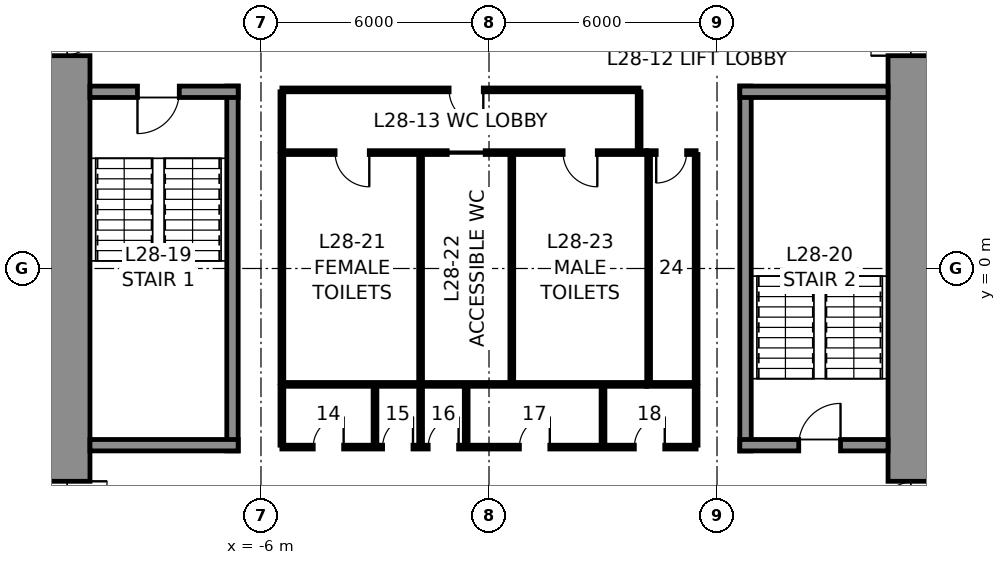
"""IFC4 building model, lengths in metres.
Left out: names, types, materials, properties, quantities, classifications, styles, units other than length and angle.
Written with IfcOpenShell. Run it as: python <this file> out.ifc"""

import sys

from ifc_helpers import new_model, si_unit, direction, frame, frame_2d, origin, place, context, subcontext, project, spatial, rectangle, extrude, element, fill, save


model = new_model("IFC4")
c1 = context("Model", 3, precision=1e-05, world=origin(), true_north=direction((0.0, 1.0)))
c2 = subcontext(c1, "Body", "Model", "MODEL_VIEW")
j1 = project(units=[si_unit("LENGTHUNIT", "METRE"), si_unit("PLANEANGLEUNIT", "RADIAN")], contexts=[c1])
p1 = place(None, origin())
s1 = spatial("IfcSite", under=j1, at=p1, CompositionType="ELEMENT")
p2 = place(p1, origin())
s2 = spatial("IfcBuilding", under=s1, at=p2, CompositionType="ELEMENT")
p3 = place(p2, frame((0.0, 0.0, 139.8)))
s3 = spatial("IfcBuildingStorey", under=s2, at=p3, CompositionType="ELEMENT", Elevation=139.8)
p4 = place(p3, frame((11.25, 10.5, 0.0), z_axis=(0.0, 0.0, 1.0), x_axis=(0.0, -1.0, 0.0)))
e1 = element("IfcWall", 1, at=p4, inside=s3, PredefinedType="SHEAR", context=c2, shape_type="SweptSolid", body=[
    extrude(rectangle(XDim=21.0, YDim=1.5, at=frame_2d((10.5, 0.0))), origin(), (0.0, 0.0, 1.0), 4.0),
])
p5 = place(p4, frame((3.7, 0.0, 0.0)))
e2 = element("IfcOpeningElement", 2, at=p5, cuts=e1, PredefinedType="OPENING", context=c2, shape_type="SweptSolid", body=[
    extrude(rectangle(XDim=1.2, YDim=2.3, at=frame_2d((0.6, 1.15))), frame((0.0, 0.76, 0.0), z_axis=(0.0, -1.0, 0.0), x_axis=(1.0, 0.0, 0.0)), (0.0, 0.0, 1.0), 1.52),
])
p6 = place(p4, frame((16.1, 0.0, 0.0)))
e3 = element("IfcOpeningElement", 3, at=p6, cuts=e1, PredefinedType="OPENING", context=c2, shape_type="SweptSolid", body=[
    extrude(rectangle(XDim=1.2, YDim=2.3, at=frame_2d((0.6, 1.15))), frame((0.0, 0.76, 0.0), z_axis=(0.0, -1.0, 0.0), x_axis=(1.0, 0.0, 0.0)), (0.0, 0.0, 1.0), 1.52),
])
p7 = place(p3, frame((-11.25, -10.5, 0.0), z_axis=(0.0, 0.0, 1.0), x_axis=(0.0, 1.0, 0.0)))
e4 = element("IfcWall", 4, at=p7, inside=s3, PredefinedType="SHEAR", context=c2, shape_type="SweptSolid", body=[
    extrude(rectangle(XDim=21.0, YDim=1.5, at=frame_2d((10.5, 0.0))), origin(), (0.0, 0.0, 1.0), 4.0),
])
p8 = place(p7, frame((16.1, 0.0, 0.0)))
e5 = element("IfcOpeningElement", 5, at=p8, cuts=e4, PredefinedType="OPENING", context=c2, shape_type="SweptSolid", body=[
    extrude(rectangle(XDim=1.2, YDim=2.3, at=frame_2d((0.6, 1.15))), frame((0.0, 0.76, 0.0), z_axis=(0.0, -1.0, 0.0), x_axis=(1.0, 0.0, 0.0)), (0.0, 0.0, 1.0), 1.52),
])
p9 = place(p7, frame((3.7, 0.0, 0.0)))
e6 = element("IfcOpeningElement", 6, at=p9, cuts=e4, PredefinedType="OPENING", context=c2, shape_type="SweptSolid", body=[
    extrude(rectangle(XDim=1.2, YDim=2.3, at=frame_2d((0.6, 1.15))), frame((0.0, 0.76, 0.0), z_axis=(0.0, -1.0, 0.0), x_axis=(1.0, 0.0, 0.0)), (0.0, 0.0, 1.0), 1.52),
])
p10 = place(p3, frame((-6.75, -4.8, 0.0), z_axis=(0.0, 0.0, 1.0), x_axis=(0.0, 1.0, 0.0)))
e7 = element("IfcWall", 7, at=p10, inside=s3, PredefinedType="SOLIDWALL", context=c2, shape_type="SweptSolid", body=[
    extrude(rectangle(XDim=9.6, YDim=0.3, at=frame_2d((4.8, 0.0))), origin(), (0.0, 0.0, 1.0), 3.75),
])
p11 = place(p3, frame((-10.5, 4.65, 0.0), z_axis=(0.0, 0.0, 1.0), x_axis=(1.0, 0.0, 0.0)))
e8 = element("IfcWall", 8, at=p11, inside=s3, PredefinedType="SOLIDWALL", context=c2, shape_type="SweptSolid", body=[
    extrude(rectangle(XDim=3.9, YDim=0.3, at=frame_2d((1.95, 0.0))), origin(), (0.0, 0.0, 1.0), 3.75),
])
p12 = place(p11, frame((1.25, 0.0, 0.0)))
e9 = element("IfcOpeningElement", 9, at=p12, cuts=e8, PredefinedType="OPENING", context=c2, shape_type="SweptSolid", body=[
    extrude(rectangle(XDim=1.1, YDim=2.3, at=frame_2d((0.55, 1.15))), frame((0.0, 0.16, 0.0), z_axis=(0.0, -1.0, 0.0), x_axis=(1.0, 0.0, 0.0)), (0.0, 0.0, 1.0), 0.32),
])
p13 = place(p3, frame((-6.6, -4.65, 0.0), z_axis=(0.0, 0.0, 1.0), x_axis=(-1.0, 0.0, 0.0)))
e10 = element("IfcWall", 10, at=p13, inside=s3, PredefinedType="SOLIDWALL", context=c2, shape_type="SweptSolid", body=[
    extrude(rectangle(XDim=3.9, YDim=0.3, at=frame_2d((1.95, 0.0))), origin(), (0.0, 0.0, 1.0), 3.75),
])
p14 = place(p3, frame((6.75, -4.8, 0.0), z_axis=(0.0, 0.0, 1.0), x_axis=(0.0, 1.0, 0.0)))
e11 = element("IfcWall", 11, at=p14, inside=s3, PredefinedType="SOLIDWALL", context=c2, shape_type="SweptSolid", body=[
    extrude(rectangle(XDim=9.6, YDim=0.3, at=frame_2d((4.8, 0.0))), origin(), (0.0, 0.0, 1.0), 3.75),
])
p15 = place(p3, frame((6.6, 4.65, 0.0), z_axis=(0.0, 0.0, 1.0), x_axis=(1.0, 0.0, 0.0)))
e12 = element("IfcWall", 12, at=p15, inside=s3, PredefinedType="SOLIDWALL", context=c2, shape_type="SweptSolid", body=[
    extrude(rectangle(XDim=3.9, YDim=0.3, at=frame_2d((1.95, 0.0))), origin(), (0.0, 0.0, 1.0), 3.75),
])
p16 = place(p3, frame((10.5, -4.65, 0.0), z_axis=(0.0, 0.0, 1.0), x_axis=(-1.0, 0.0, 0.0)))
e13 = element("IfcWall", 13, at=p16, inside=s3, PredefinedType="SOLIDWALL", context=c2, shape_type="SweptSolid", body=[
    extrude(rectangle(XDim=3.9, YDim=0.3, at=frame_2d((1.95, 0.0))), origin(), (0.0, 0.0, 1.0), 3.75),
])
p17 = place(p16, frame((1.25, 0.0, 0.0)))
e14 = element("IfcOpeningElement", 14, at=p17, cuts=e13, PredefinedType="OPENING", context=c2, shape_type="SweptSolid", body=[
    extrude(rectangle(XDim=1.1, YDim=2.3, at=frame_2d((0.55, 1.15))), frame((0.0, 0.16, 0.0), z_axis=(0.0, -1.0, 0.0), x_axis=(1.0, 0.0, 0.0)), (0.0, 0.0, 1.0), 0.32),
])
p18 = place(p3, frame((-5.45, 3.05, 0.0), z_axis=(0.0, 0.0, 1.0), x_axis=(1.0, 0.0, 0.0)))
e15 = element("IfcWall", 15, at=p18, inside=s3, PredefinedType="PARTITIONING", context=c2, shape_type="SweptSolid", body=[
    extrude(rectangle(XDim=9.6, YDim=0.1, at=frame_2d((4.8, 0.0))), origin(), (0.0, 0.0, 1.0), 3.75),
])
p19 = place(p18, frame((1.4, 0.0, 0.0)))
e16 = element("IfcOpeningElement", 16, at=p19, cuts=e15, PredefinedType="OPENING", context=c2, shape_type="SweptSolid", body=[
    extrude(rectangle(XDim=0.9, YDim=2.3, at=frame_2d((0.45, 1.15))), frame((0.0, 0.06, 0.0), z_axis=(0.0, -1.0, 0.0), x_axis=(1.0, 0.0, 0.0)), (0.0, 0.0, 1.0), 0.12),
])
p20 = place(p18, frame((4.35, 0.0, 0.0)))
e17 = element("IfcOpeningElement", 17, at=p20, cuts=e15, PredefinedType="OPENING", context=c2, shape_type="SweptSolid", body=[
    extrude(rectangle(XDim=1.0, YDim=2.3, at=frame_2d((0.5, 1.15))), frame((0.0, 0.06, 0.0), z_axis=(0.0, -1.0, 0.0), x_axis=(1.0, 0.0, 0.0)), (0.0, 0.0, 1.0), 0.12),
])
p21 = place(p18, frame((7.4, 0.0, 0.0)))
e18 = element("IfcOpeningElement", 18, at=p21, cuts=e15, PredefinedType="OPENING", context=c2, shape_type="SweptSolid", body=[
    extrude(rectangle(XDim=0.9, YDim=2.3, at=frame_2d((0.45, 1.15))), frame((0.0, 0.06, 0.0), z_axis=(0.0, -1.0, 0.0), x_axis=(1.0, 0.0, 0.0)), (0.0, 0.0, 1.0), 0.12),
])
p22 = place(p3, frame((4.15, 3.05, 0.0), z_axis=(0.0, 0.0, 1.0), x_axis=(1.0, 0.0, 0.0)))
e19 = element("IfcWall", 19, at=p22, inside=s3, PredefinedType="PARTITIONING", context=c2, shape_type="SweptSolid", body=[
    extrude(rectangle(XDim=1.3, YDim=0.1, at=frame_2d((0.65, 0.0))), origin(), (0.0, 0.0, 1.0), 3.75),
])
p23 = place(p22, frame((0.25, 0.0, 0.0)))
e20 = element("IfcOpeningElement", 20, at=p23, cuts=e19, PredefinedType="OPENING", context=c2, shape_type="SweptSolid", body=[
    extrude(rectangle(XDim=0.8, YDim=2.3, at=frame_2d((0.4, 1.15))), frame((0.0, 0.06, 0.0), z_axis=(0.0, -1.0, 0.0), x_axis=(1.0, 0.0, 0.0)), (0.0, 0.0, 1.0), 0.12),
])
p24 = place(p3, frame((4.15, -3.05, 0.0), z_axis=(0.0, 0.0, 1.0), x_axis=(-1.0, 0.0, 0.0)))
e21 = element("IfcWall", 21, at=p24, inside=s3, PredefinedType="PARTITIONING", context=c2, shape_type="SweptSolid", body=[
    extrude(rectangle(XDim=9.6, YDim=0.1, at=frame_2d((4.8, 0.0))), origin(), (0.0, 0.0, 1.0), 3.75),
])
p25 = place(p3, frame((5.45, -3.05, 0.0), z_axis=(0.0, 0.0, 1.0), x_axis=(-1.0, 0.0, 0.0)))
e22 = element("IfcWall", 22, at=p25, inside=s3, PredefinedType="PARTITIONING", context=c2, shape_type="SweptSolid", body=[
    extrude(rectangle(XDim=1.3, YDim=0.1, at=frame_2d((0.65, 0.0))), origin(), (0.0, 0.0, 1.0), 3.75),
])
for number, where, z_axis, x_axis in (
    (23, (5.45, 3.0, 0.0), (0.0, 0.0, 1.0), (0.0, -1.0, 0.0)),
    (24, (-5.45, -3.0, 0.0), (0.0, 0.0, 1.0), (0.0, 1.0, 0.0)),
    (25, (-1.8, -3.0, 0.0), (0.0, 0.0, 1.0), (0.0, 1.0, 0.0)),
    (26, (0.6, -3.0, 0.0), (0.0, 0.0, 1.0), (0.0, 1.0, 0.0)),
    (27, (4.2, -3.0, 0.0), (0.0, 0.0, 1.0), (0.0, 1.0, 0.0)),
):
    element("IfcWall", number, at=place(p3, frame(where, z_axis=z_axis, x_axis=x_axis)), inside=s3, PredefinedType="PARTITIONING", context=c2, shape_type="SweptSolid", body=[
        extrude(rectangle(XDim=6.0, YDim=0.1, at=frame_2d((3.0, 0.0))), origin(), (0.0, 0.0, 1.0), 3.75),
    ])
p26 = place(p3, frame((-5.45, 4.7, 0.0), z_axis=(0.0, 0.0, 1.0), x_axis=(1.0, 0.0, 0.0)))
e28 = element("IfcWall", 28, at=p26, inside=s3, PredefinedType="PARTITIONING", context=c2, shape_type="SweptSolid", body=[
    extrude(rectangle(XDim=9.4, YDim=0.1, at=frame_2d((4.7, 0.0))), origin(), (0.0, 0.0, 1.0), 3.75),
])
p27 = place(p26, frame((4.4, 0.0, 0.0)))
e29 = element("IfcOpeningElement", 29, at=p27, cuts=e28, PredefinedType="OPENING", context=c2, shape_type="SweptSolid", body=[
    extrude(rectangle(XDim=0.9, YDim=2.3, at=frame_2d((0.45, 1.15))), frame((0.0, 0.06, 0.0), z_axis=(0.0, -1.0, 0.0), x_axis=(1.0, 0.0, 0.0)), (0.0, 0.0, 1.0), 0.12),
])
for number, where, z_axis, x_axis in (
    (30, (-5.45, 3.1, 0.0), (0.0, 0.0, 1.0), (0.0, 1.0, 0.0)),
    (31, (3.95, 3.1, 0.0), (0.0, 0.0, 1.0), (0.0, 1.0, 0.0)),
):
    element("IfcWall", number, at=place(p3, frame(where, z_axis=z_axis, x_axis=x_axis)), inside=s3, PredefinedType="PARTITIONING", context=c2, shape_type="SweptSolid", body=[
        extrude(rectangle(XDim=1.55, YDim=0.1, at=frame_2d((0.775, 0.0))), origin(), (0.0, 0.0, 1.0), 3.75),
    ])
p28 = place(p3, frame((5.45, -4.7, 0.0), z_axis=(0.0, 0.0, 1.0), x_axis=(-1.0, 0.0, 0.0)))
e32 = element("IfcWall", 32, at=p28, inside=s3, PredefinedType="PARTITIONING", context=c2, shape_type="SweptSolid", body=[
    extrude(rectangle(XDim=10.9, YDim=0.1, at=frame_2d((5.45, 0.0))), origin(), (0.0, 0.0, 1.0), 3.75),
])
p29 = place(p28, frame((9.275, 0.0, 0.0)))
e33 = element("IfcOpeningElement", 33, at=p29, cuts=e32, PredefinedType="OPENING", context=c2, shape_type="SweptSolid", body=[
    extrude(rectangle(XDim=0.8, YDim=2.3, at=frame_2d((0.4, 1.15))), frame((0.0, 0.06, 0.0), z_axis=(0.0, -1.0, 0.0), x_axis=(1.0, 0.0, 0.0)), (0.0, 0.0, 1.0), 0.12),
])
p30 = place(p28, frame((7.45, 0.0, 0.0)))
e34 = element("IfcOpeningElement", 34, at=p30, cuts=e32, PredefinedType="OPENING", context=c2, shape_type="SweptSolid", body=[
    extrude(rectangle(XDim=0.8, YDim=2.3, at=frame_2d((0.4, 1.15))), frame((0.0, 0.06, 0.0), z_axis=(0.0, -1.0, 0.0), x_axis=(1.0, 0.0, 0.0)), (0.0, 0.0, 1.0), 0.12),
])
p31 = place(p28, frame((6.25, 0.0, 0.0)))
e35 = element("IfcOpeningElement", 35, at=p31, cuts=e32, PredefinedType="OPENING", context=c2, shape_type="SweptSolid", body=[
    extrude(rectangle(XDim=0.8, YDim=2.3, at=frame_2d((0.4, 1.15))), frame((0.0, 0.06, 0.0), z_axis=(0.0, -1.0, 0.0), x_axis=(1.0, 0.0, 0.0)), (0.0, 0.0, 1.0), 0.12),
])
p32 = place(p28, frame((3.85, 0.0, 0.0)))
e36 = element("IfcOpeningElement", 36, at=p32, cuts=e32, PredefinedType="OPENING", context=c2, shape_type="SweptSolid", body=[
    extrude(rectangle(XDim=0.8, YDim=2.3, at=frame_2d((0.4, 1.15))), frame((0.0, 0.06, 0.0), z_axis=(0.0, -1.0, 0.0), x_axis=(1.0, 0.0, 0.0)), (0.0, 0.0, 1.0), 0.12),
])
p33 = place(p28, frame((0.825, 0.0, 0.0)))
e37 = element("IfcOpeningElement", 37, at=p33, cuts=e32, PredefinedType="OPENING", context=c2, shape_type="SweptSolid", body=[
    extrude(rectangle(XDim=0.8, YDim=2.3, at=frame_2d((0.4, 1.15))), frame((0.0, 0.06, 0.0), z_axis=(0.0, -1.0, 0.0), x_axis=(1.0, 0.0, 0.0)), (0.0, 0.0, 1.0), 0.12),
])
for number, where, z_axis, x_axis in (
    (38, (-5.45, -3.1, 0.0), (0.0, 0.0, 1.0), (0.0, -1.0, 0.0)),
    (39, (5.45, -3.1, 0.0), (0.0, 0.0, 1.0), (0.0, -1.0, 0.0)),
    (40, (-3.0, -3.1, 0.0), (0.0, 0.0, 1.0), (0.0, -1.0, 0.0)),
    (41, (-1.8, -3.1, 0.0), (0.0, 0.0, 1.0), (0.0, -1.0, 0.0)),
    (42, (-0.6, -3.1, 0.0), (0.0, 0.0, 1.0), (0.0, -1.0, 0.0)),
    (43, (3.0, -3.1, 0.0), (0.0, 0.0, 1.0), (0.0, -1.0, 0.0)),
):
    element("IfcWall", number, at=place(p3, frame(where, z_axis=z_axis, x_axis=x_axis)), inside=s3, PredefinedType="PARTITIONING", context=c2, shape_type="SweptSolid", body=[
        extrude(rectangle(XDim=1.55, YDim=0.1, at=frame_2d((0.775, 0.0))), origin(), (0.0, 0.0, 1.0), 3.75),
    ])
p34 = place(p12, frame((1.1, 0.0, 0.0), z_axis=(0.0, 0.0, 1.0), x_axis=(-1.0, 0.0, 0.0)))
e44 = element("IfcDoor", 44, at=p34, inside=s3, OperationType="SINGLE_SWING_RIGHT", PredefinedType="DOOR", context=c2, shape_type="SweptSolid", body=[
    extrude(rectangle(XDim=1.1, YDim=2.3, at=frame_2d((0.55, 1.15))), frame((0.0, 0.025, 0.0), z_axis=(0.0, -1.0, 0.0), x_axis=(1.0, 0.0, 0.0)), (0.0, 0.0, 1.0), 0.05),
])
fill(e9, e44)
p35 = place(p17, frame((1.1, 0.0, 0.0), z_axis=(0.0, 0.0, 1.0), x_axis=(-1.0, 0.0, 0.0)))
e45 = element("IfcDoor", 45, at=p35, inside=s3, OperationType="SINGLE_SWING_RIGHT", PredefinedType="DOOR", context=c2, shape_type="SweptSolid", body=[
    extrude(rectangle(XDim=1.1, YDim=2.3, at=frame_2d((0.55, 1.15))), frame((0.0, 0.025, 0.0), z_axis=(0.0, -1.0, 0.0), x_axis=(1.0, 0.0, 0.0)), (0.0, 0.0, 1.0), 0.05),
])
fill(e14, e45)
p36 = place(p19, frame((0.9, 0.0, 0.0), z_axis=(0.0, 0.0, 1.0), x_axis=(-1.0, 0.0, 0.0)))
e46 = element("IfcDoor", 46, at=p36, inside=s3, OperationType="SINGLE_SWING_LEFT", PredefinedType="DOOR", context=c2, shape_type="SweptSolid", body=[
    extrude(rectangle(XDim=0.9, YDim=2.3, at=frame_2d((0.45, 1.15))), frame((0.0, 0.025, 0.0), z_axis=(0.0, -1.0, 0.0), x_axis=(1.0, 0.0, 0.0)), (0.0, 0.0, 1.0), 0.05),
])
fill(e16, e46)
p37 = place(p20, frame((1.0, 0.0, 0.0), z_axis=(0.0, 0.0, 1.0), x_axis=(-1.0, 0.0, 0.0)))
e47 = element("IfcDoor", 47, at=p37, inside=s3, OperationType="SLIDING_TO_LEFT", PredefinedType="DOOR", context=c2, shape_type="SweptSolid", body=[
    extrude(rectangle(XDim=1.0, YDim=2.3, at=frame_2d((0.5, 1.15))), frame((0.0, 0.025, 0.0), z_axis=(0.0, -1.0, 0.0), x_axis=(1.0, 0.0, 0.0)), (0.0, 0.0, 1.0), 0.05),
])
fill(e17, e47)
p38 = place(p21, frame((0.9, 0.0, 0.0), z_axis=(0.0, 0.0, 1.0), x_axis=(-1.0, 0.0, 0.0)))
e48 = element("IfcDoor", 48, at=p38, inside=s3, OperationType="SINGLE_SWING_LEFT", PredefinedType="DOOR", context=c2, shape_type="SweptSolid", body=[
    extrude(rectangle(XDim=0.9, YDim=2.3, at=frame_2d((0.45, 1.15))), frame((0.0, 0.025, 0.0), z_axis=(0.0, -1.0, 0.0), x_axis=(1.0, 0.0, 0.0)), (0.0, 0.0, 1.0), 0.05),
])
fill(e18, e48)
p39 = place(p23, frame((0.8, 0.0, 0.0), z_axis=(0.0, 0.0, 1.0), x_axis=(-1.0, 0.0, 0.0)))
e49 = element("IfcDoor", 49, at=p39, inside=s3, OperationType="SINGLE_SWING_RIGHT", PredefinedType="DOOR", context=c2, shape_type="SweptSolid", body=[
    extrude(rectangle(XDim=0.8, YDim=2.3, at=frame_2d((0.4, 1.15))), frame((0.0, 0.025, 0.0), z_axis=(0.0, -1.0, 0.0), x_axis=(1.0, 0.0, 0.0)), (0.0, 0.0, 1.0), 0.05),
])
fill(e20, e49)
p40 = place(p27, frame((0.9, 0.0, 0.0), z_axis=(0.0, 0.0, 1.0), x_axis=(-1.0, 0.0, 0.0)))
e50 = element("IfcDoor", 50, at=p40, inside=s3, OperationType="SINGLE_SWING_LEFT", PredefinedType="DOOR", context=c2, shape_type="SweptSolid", body=[
    extrude(rectangle(XDim=0.9, YDim=2.3, at=frame_2d((0.45, 1.15))), frame((0.0, 0.025, 0.0), z_axis=(0.0, -1.0, 0.0), x_axis=(1.0, 0.0, 0.0)), (0.0, 0.0, 1.0), 0.05),
])
fill(e29, e50)
p41 = place(p29, frame((0.8, 0.0, 0.0), z_axis=(0.0, 0.0, 1.0), x_axis=(-1.0, 0.0, 0.0)))
e51 = element("IfcDoor", 51, at=p41, inside=s3, OperationType="SINGLE_SWING_RIGHT", PredefinedType="DOOR", context=c2, shape_type="SweptSolid", body=[
    extrude(rectangle(XDim=0.8, YDim=2.3, at=frame_2d((0.4, 1.15))), frame((0.0, 0.025, 0.0), z_axis=(0.0, -1.0, 0.0), x_axis=(1.0, 0.0, 0.0)), (0.0, 0.0, 1.0), 0.05),
])
fill(e33, e51)
p42 = place(p30, frame((0.8, 0.0, 0.0), z_axis=(0.0, 0.0, 1.0), x_axis=(-1.0, 0.0, 0.0)))
e52 = element("IfcDoor", 52, at=p42, inside=s3, OperationType="SINGLE_SWING_RIGHT", PredefinedType="DOOR", context=c2, shape_type="SweptSolid", body=[
    extrude(rectangle(XDim=0.8, YDim=2.3, at=frame_2d((0.4, 1.15))), frame((0.0, 0.025, 0.0), z_axis=(0.0, -1.0, 0.0), x_axis=(1.0, 0.0, 0.0)), (0.0, 0.0, 1.0), 0.05),
])
fill(e34, e52)
p43 = place(p31, frame((0.8, 0.0, 0.0), z_axis=(0.0, 0.0, 1.0), x_axis=(-1.0, 0.0, 0.0)))
e53 = element("IfcDoor", 53, at=p43, inside=s3, OperationType="SINGLE_SWING_RIGHT", PredefinedType="DOOR", context=c2, shape_type="SweptSolid", body=[
    extrude(rectangle(XDim=0.8, YDim=2.3, at=frame_2d((0.4, 1.15))), frame((0.0, 0.025, 0.0), z_axis=(0.0, -1.0, 0.0), x_axis=(1.0, 0.0, 0.0)), (0.0, 0.0, 1.0), 0.05),
])
fill(e35, e53)
p44 = place(p32, frame((0.8, 0.0, 0.0), z_axis=(0.0, 0.0, 1.0), x_axis=(-1.0, 0.0, 0.0)))
e54 = element("IfcDoor", 54, at=p44, inside=s3, OperationType="SINGLE_SWING_RIGHT", PredefinedType="DOOR", context=c2, shape_type="SweptSolid", body=[
    extrude(rectangle(XDim=0.8, YDim=2.3, at=frame_2d((0.4, 1.15))), frame((0.0, 0.025, 0.0), z_axis=(0.0, -1.0, 0.0), x_axis=(1.0, 0.0, 0.0)), (0.0, 0.0, 1.0), 0.05),
])
fill(e36, e54)
p45 = place(p33, frame((0.8, 0.0, 0.0), z_axis=(0.0, 0.0, 1.0), x_axis=(-1.0, 0.0, 0.0)))
e55 = element("IfcDoor", 55, at=p45, inside=s3, OperationType="SINGLE_SWING_RIGHT", PredefinedType="DOOR", context=c2, shape_type="SweptSolid", body=[
    extrude(rectangle(XDim=0.8, YDim=2.3, at=frame_2d((0.4, 1.15))), frame((0.0, 0.025, 0.0), z_axis=(0.0, -1.0, 0.0), x_axis=(1.0, 0.0, 0.0)), (0.0, 0.0, 1.0), 0.05),
])
fill(e37, e55)
p46 = place(p8, frame((1.2, 0.0, 0.0), z_axis=(0.0, 0.0, 1.0), x_axis=(-1.0, 0.0, 0.0)))
e56 = element("IfcDoor", 56, at=p46, inside=s3, OperationType="SINGLE_SWING_LEFT", PredefinedType="DOOR", context=c2, shape_type="SweptSolid", body=[
    extrude(rectangle(XDim=1.2, YDim=2.3, at=frame_2d((0.6, 1.15))), frame((0.0, 0.025, 0.0), z_axis=(0.0, -1.0, 0.0), x_axis=(1.0, 0.0, 0.0)), (0.0, 0.0, 1.0), 0.05),
])
fill(e5, e56)
p47 = place(p9, frame((1.2, 0.0, 0.0), z_axis=(0.0, 0.0, 1.0), x_axis=(-1.0, 0.0, 0.0)))
e57 = element("IfcDoor", 57, at=p47, inside=s3, OperationType="SINGLE_SWING_LEFT", PredefinedType="DOOR", context=c2, shape_type="SweptSolid", body=[
    extrude(rectangle(XDim=1.2, YDim=2.3, at=frame_2d((0.6, 1.15))), frame((0.0, 0.025, 0.0), z_axis=(0.0, -1.0, 0.0), x_axis=(1.0, 0.0, 0.0)), (0.0, 0.0, 1.0), 0.05),
])
fill(e6, e57)
p48 = place(p5, frame((1.2, 0.0, 0.0), z_axis=(0.0, 0.0, 1.0), x_axis=(-1.0, 0.0, 0.0)))
e58 = element("IfcDoor", 58, at=p48, inside=s3, OperationType="SINGLE_SWING_LEFT", PredefinedType="DOOR", context=c2, shape_type="SweptSolid", body=[
    extrude(rectangle(XDim=1.2, YDim=2.3, at=frame_2d((0.6, 1.15))), frame((0.0, 0.025, 0.0), z_axis=(0.0, -1.0, 0.0), x_axis=(1.0, 0.0, 0.0)), (0.0, 0.0, 1.0), 0.05),
])
fill(e2, e58)
p49 = place(p6, frame((1.2, 0.0, 0.0), z_axis=(0.0, 0.0, 1.0), x_axis=(-1.0, 0.0, 0.0)))
e59 = element("IfcDoor", 59, at=p49, inside=s3, OperationType="SINGLE_SWING_LEFT", PredefinedType="DOOR", context=c2, shape_type="SweptSolid", body=[
    extrude(rectangle(XDim=1.2, YDim=2.3, at=frame_2d((0.6, 1.15))), frame((0.0, 0.025, 0.0), z_axis=(0.0, -1.0, 0.0), x_axis=(1.0, 0.0, 0.0)), (0.0, 0.0, 1.0), 0.05),
])
fill(e3, e59)
save(model, sys.argv[1])
